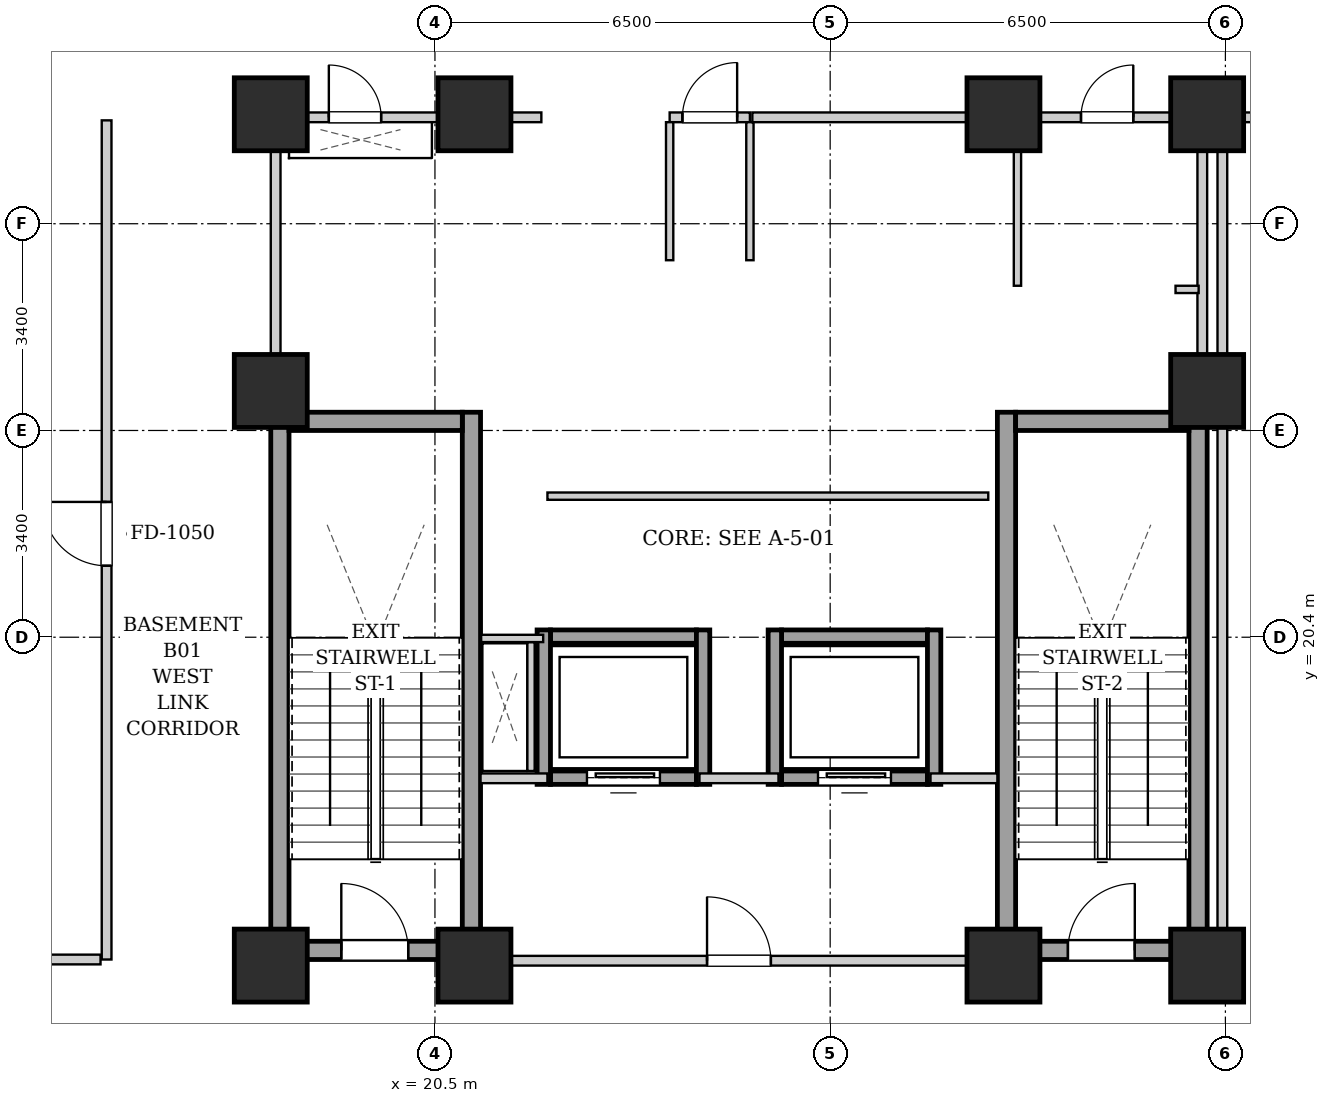
"""IFC4 building model, lengths in metres.
Left out: names, types, materials, properties, quantities, classifications, styles, units other than length and angle.
Written with IfcOpenShell. Run it as: python <this file> out.ifc"""

import sys

from ifc_helpers import new_model, si_unit, direction, frame, frame_2d, origin, origin_2d, place, context, subcontext, project, spatial, rectangle, extrude, element, fill, save


model = new_model("IFC4")
c1 = context("Model", 3, precision=1e-05, world=origin(), true_north=direction((0.0, 1.0)))
c2 = subcontext(c1, "Body", "Model", "MODEL_VIEW")
j1 = project(units=[si_unit("LENGTHUNIT", "METRE"), si_unit("PLANEANGLEUNIT", "RADIAN")], contexts=[c1])
p1 = place(None, origin())
s1 = spatial("IfcSite", under=j1, at=p1, CompositionType="ELEMENT")
p2 = place(p1, origin())
s2 = spatial("IfcBuilding", under=s1, at=p2, CompositionType="ELEMENT")
p3 = place(p2, frame((0.0, 0.0, -4.8)))
s3 = spatial("IfcBuildingStorey", under=s2, at=p3, CompositionType="ELEMENT", Elevation=-4.8)
for number, where, z_axis, x_axis in (
    (1, (17.8, 15.0, 0.0), (0.0, 0.0, 1.0), (1.0, 0.0, 0.0)),
    (2, (21.15, 15.0, 0.0), (0.0, 0.0, 1.0), (1.0, 0.0, 0.0)),
    (3, (29.85, 15.0, 0.0), (0.0, 0.0, 1.0), (1.0, 0.0, 0.0)),
    (4, (33.2, 15.0, 0.0), (0.0, 0.0, 1.0), (1.0, 0.0, 0.0)),
    (5, (17.8, 29.0, 0.0), (0.0, 0.0, 1.0), (1.0, 0.0, 0.0)),
    (6, (21.15, 29.0, 0.0), (0.0, 0.0, 1.0), (1.0, 0.0, 0.0)),
    (7, (29.85, 29.0, 0.0), (0.0, 0.0, 1.0), (1.0, 0.0, 0.0)),
    (8, (33.2, 29.0, 0.0), (0.0, 0.0, 1.0), (1.0, 0.0, 0.0)),
    (9, (17.8, 24.45, 0.0), (0.0, 0.0, 1.0), (1.0, 0.0, 0.0)),
    (10, (33.2, 24.45, 0.0), (0.0, 0.0, 1.0), (1.0, 0.0, 0.0)),
):
    element("IfcColumn", number, at=place(p3, frame(where, z_axis=z_axis, x_axis=x_axis)), inside=s3, PredefinedType="COLUMN", context=c2, shape_type="SweptSolid", body=[
        extrude(rectangle(XDim=1.2, YDim=1.2, at=origin_2d()), origin(), (0.0, 0.0, 1.0), 4.8),
    ])
for number, where, z_axis, x_axis in (
    (11, (17.95, 15.1, 0.0), (0.0, 0.0, 1.0), (0.0, 1.0, 0.0)),
    (12, (21.1, 15.1, 0.0), (0.0, 0.0, 1.0), (0.0, 1.0, 0.0)),
):
    element("IfcWall", number, at=place(p3, frame(where, z_axis=z_axis, x_axis=x_axis)), inside=s3, PredefinedType="SHEAR", context=c2, shape_type="SweptSolid", body=[
        extrude(rectangle(XDim=9.0, YDim=0.3, at=frame_2d((4.5, 0.0))), origin(), (0.0, 0.0, 1.0), 4.48),
    ])
p4 = place(p3, frame((18.1, 23.95, 0.0), z_axis=(0.0, 0.0, 1.0), x_axis=(1.0, 0.0, 0.0)))
e13 = element("IfcWall", 13, at=p4, inside=s3, PredefinedType="SHEAR", context=c2, shape_type="SweptSolid", body=[
    extrude(rectangle(XDim=2.85, YDim=0.3, at=frame_2d((1.425, 0.0))), origin(), (0.0, 0.0, 1.0), 4.48),
])
p5 = place(p3, frame((18.1, 15.25, 0.0), z_axis=(0.0, 0.0, 1.0), x_axis=(1.0, 0.0, 0.0)))
e14 = element("IfcWall", 14, at=p5, inside=s3, PredefinedType="SHEAR", context=c2, shape_type="SweptSolid", body=[
    extrude(rectangle(XDim=2.85, YDim=0.3, at=frame_2d((1.425, 0.0))), origin(), (0.0, 0.0, 1.0), 4.48),
])
p6 = place(p5, frame((0.86, 0.0, 0.0)))
e15 = element("IfcOpeningElement", 15, at=p6, cuts=e14, PredefinedType="OPENING", context=c2, shape_type="SweptSolid", body=[
    extrude(rectangle(XDim=1.1, YDim=2.05, at=frame_2d((0.55, 1.025))), frame((0.0, 0.16, 0.0), z_axis=(0.0, -1.0, 0.0), x_axis=(1.0, 0.0, 0.0)), (0.0, 0.0, 1.0), 0.32),
])
for number, where, z_axis, x_axis in (
    (16, (29.9, 15.1, 0.0), (0.0, 0.0, 1.0), (0.0, 1.0, 0.0)),
    (17, (33.05, 15.1, 0.0), (0.0, 0.0, 1.0), (0.0, 1.0, 0.0)),
):
    element("IfcWall", number, at=place(p3, frame(where, z_axis=z_axis, x_axis=x_axis)), inside=s3, PredefinedType="SHEAR", context=c2, shape_type="SweptSolid", body=[
        extrude(rectangle(XDim=9.0, YDim=0.3, at=frame_2d((4.5, 0.0))), origin(), (0.0, 0.0, 1.0), 4.48),
    ])
p7 = place(p3, frame((30.05, 23.95, 0.0), z_axis=(0.0, 0.0, 1.0), x_axis=(1.0, 0.0, 0.0)))
e18 = element("IfcWall", 18, at=p7, inside=s3, PredefinedType="SHEAR", context=c2, shape_type="SweptSolid", body=[
    extrude(rectangle(XDim=2.85, YDim=0.3, at=frame_2d((1.425, 0.0))), origin(), (0.0, 0.0, 1.0), 4.48),
])
p8 = place(p3, frame((30.05, 15.25, 0.0), z_axis=(0.0, 0.0, 1.0), x_axis=(1.0, 0.0, 0.0)))
e19 = element("IfcWall", 19, at=p8, inside=s3, PredefinedType="SHEAR", context=c2, shape_type="SweptSolid", body=[
    extrude(rectangle(XDim=2.85, YDim=0.3, at=frame_2d((1.425, 0.0))), origin(), (0.0, 0.0, 1.0), 4.48),
])
p9 = place(p8, frame((0.86, 0.0, 0.0)))
e20 = element("IfcOpeningElement", 20, at=p9, cuts=e19, PredefinedType="OPENING", context=c2, shape_type="SweptSolid", body=[
    extrude(rectangle(XDim=1.1, YDim=2.05, at=frame_2d((0.55, 1.025))), frame((0.0, 0.16, 0.0), z_axis=(0.0, -1.0, 0.0), x_axis=(1.0, 0.0, 0.0)), (0.0, 0.0, 1.0), 0.32),
])
p10 = place(p3, frame((22.4, 18.09, 0.0), z_axis=(0.0, 0.0, 1.0), x_axis=(1.0, 0.0, 0.0)))
e21 = element("IfcWall", 21, at=p10, inside=s3, PredefinedType="SHEAR", context=c2, shape_type="SweptSolid", body=[
    extrude(rectangle(XDim=2.4, YDim=0.22, at=frame_2d((1.2, 0.0))), origin(), (0.0, 0.0, 1.0), 4.48),
])
p11 = place(p10, frame((0.6, 0.0, 0.0)))
e22 = element("IfcOpeningElement", 22, at=p11, cuts=e21, PredefinedType="OPENING", context=c2, shape_type="SweptSolid", body=[
    extrude(rectangle(XDim=1.2, YDim=2.15, at=frame_2d((0.6, 1.075))), frame((0.0, 0.12, 0.0), z_axis=(0.0, -1.0, 0.0), x_axis=(1.0, 0.0, 0.0)), (0.0, 0.0, 1.0), 0.24),
])
p12 = place(p3, frame((22.4, 20.41, 0.0), z_axis=(0.0, 0.0, 1.0), x_axis=(1.0, 0.0, 0.0)))
e23 = element("IfcWall", 23, at=p12, inside=s3, PredefinedType="SHEAR", context=c2, shape_type="SweptSolid", body=[
    extrude(rectangle(XDim=2.4, YDim=0.22, at=frame_2d((1.2, 0.0))), origin(), (0.0, 0.0, 1.0), 4.48),
])
for number, where, z_axis, x_axis in (
    (24, (22.29, 17.98, 0.0), (0.0, 0.0, 1.0), (0.0, 1.0, 0.0)),
    (25, (24.91, 17.98, 0.0), (0.0, 0.0, 1.0), (0.0, 1.0, 0.0)),
):
    element("IfcWall", number, at=place(p3, frame(where, z_axis=z_axis, x_axis=x_axis)), inside=s3, PredefinedType="SHEAR", context=c2, shape_type="SweptSolid", body=[
        extrude(rectangle(XDim=2.54, YDim=0.22, at=frame_2d((1.27, 0.0))), origin(), (0.0, 0.0, 1.0), 4.48),
    ])
p13 = place(p3, frame((26.2, 18.09, 0.0), z_axis=(0.0, 0.0, 1.0), x_axis=(1.0, 0.0, 0.0)))
e26 = element("IfcWall", 26, at=p13, inside=s3, PredefinedType="SHEAR", context=c2, shape_type="SweptSolid", body=[
    extrude(rectangle(XDim=2.4, YDim=0.22, at=frame_2d((1.2, 0.0))), origin(), (0.0, 0.0, 1.0), 4.48),
])
p14 = place(p13, frame((0.6, 0.0, 0.0)))
e27 = element("IfcOpeningElement", 27, at=p14, cuts=e26, PredefinedType="OPENING", context=c2, shape_type="SweptSolid", body=[
    extrude(rectangle(XDim=1.2, YDim=2.15, at=frame_2d((0.6, 1.075))), frame((0.0, 0.12, 0.0), z_axis=(0.0, -1.0, 0.0), x_axis=(1.0, 0.0, 0.0)), (0.0, 0.0, 1.0), 0.24),
])
p15 = place(p3, frame((26.2, 20.41, 0.0), z_axis=(0.0, 0.0, 1.0), x_axis=(1.0, 0.0, 0.0)))
e28 = element("IfcWall", 28, at=p15, inside=s3, PredefinedType="SHEAR", context=c2, shape_type="SweptSolid", body=[
    extrude(rectangle(XDim=2.4, YDim=0.22, at=frame_2d((1.2, 0.0))), origin(), (0.0, 0.0, 1.0), 4.48),
])
for number, where, z_axis, x_axis in (
    (29, (26.09, 17.98, 0.0), (0.0, 0.0, 1.0), (0.0, 1.0, 0.0)),
    (30, (28.71, 17.98, 0.0), (0.0, 0.0, 1.0), (0.0, 1.0, 0.0)),
):
    element("IfcWall", number, at=place(p3, frame(where, z_axis=z_axis, x_axis=x_axis)), inside=s3, PredefinedType="SHEAR", context=c2, shape_type="SweptSolid", body=[
        extrude(rectangle(XDim=2.54, YDim=0.22, at=frame_2d((1.27, 0.0))), origin(), (0.0, 0.0, 1.0), 4.48),
    ])
p16 = place(p3, frame((21.25, 15.08, 0.0), z_axis=(0.0, 0.0, 1.0), x_axis=(1.0, 0.0, 0.0)))
e31 = element("IfcWall", 31, at=p16, inside=s3, PredefinedType="PARTITIONING", context=c2, shape_type="SweptSolid", body=[
    extrude(rectangle(XDim=8.5, YDim=0.16, at=frame_2d((4.25, 0.0))), origin(), (0.0, 0.0, 1.0), 4.48),
])
p17 = place(p16, frame((3.725, 0.0, 0.0)))
e32 = element("IfcOpeningElement", 32, at=p17, cuts=e31, PredefinedType="OPENING", context=c2, shape_type="SweptSolid", body=[
    extrude(rectangle(XDim=1.05, YDim=2.05, at=frame_2d((0.525, 1.025))), frame((0.0, 0.09, 0.0), z_axis=(0.0, -1.0, 0.0), x_axis=(1.0, 0.0, 0.0)), (0.0, 0.0, 1.0), 0.18),
])
p18 = place(p3, frame((21.25, 18.08, 0.0), z_axis=(0.0, 0.0, 1.0), x_axis=(1.0, 0.0, 0.0)))
e33 = element("IfcWall", 33, at=p18, inside=s3, PredefinedType="PARTITIONING", context=c2, shape_type="SweptSolid", body=[
    extrude(rectangle(XDim=1.1, YDim=0.16, at=frame_2d((0.55, 0.0))), origin(), (0.0, 0.0, 1.0), 4.48),
])
p19 = place(p3, frame((24.85, 18.08, 0.0), z_axis=(0.0, 0.0, 1.0), x_axis=(1.0, 0.0, 0.0)))
e34 = element("IfcWall", 34, at=p19, inside=s3, PredefinedType="PARTITIONING", context=c2, shape_type="SweptSolid", body=[
    extrude(rectangle(XDim=1.3, YDim=0.16, at=frame_2d((0.65, 0.0))), origin(), (0.0, 0.0, 1.0), 4.48),
])
p20 = place(p3, frame((28.65, 18.08, 0.0), z_axis=(0.0, 0.0, 1.0), x_axis=(1.0, 0.0, 0.0)))
e35 = element("IfcWall", 35, at=p20, inside=s3, PredefinedType="PARTITIONING", context=c2, shape_type="SweptSolid", body=[
    extrude(rectangle(XDim=1.1, YDim=0.16, at=frame_2d((0.55, 0.0))), origin(), (0.0, 0.0, 1.0), 4.48),
])
for number, where, z_axis, x_axis in (
    (36, (17.88, 24.12, 0.0), (0.0, 0.0, 1.0), (0.0, 1.0, 0.0)),
    (37, (33.12, 24.12, 0.0), (0.0, 0.0, 1.0), (0.0, 1.0, 0.0)),
):
    element("IfcWall", number, at=place(p3, frame(where, z_axis=z_axis, x_axis=x_axis)), inside=s3, PredefinedType="PARTITIONING", context=c2, shape_type="SweptSolid", body=[
        extrude(rectangle(XDim=4.76, YDim=0.16, at=frame_2d((2.38, 0.0))), origin(), (0.0, 0.0, 1.0), 4.48),
    ])
p21 = place(p3, frame((24.36, 28.95, 0.0), z_axis=(0.0, 0.0, 1.0), x_axis=(1.0, 0.0, 0.0)))
e38 = element("IfcWall", 38, at=p21, inside=s3, PredefinedType="PARTITIONING", context=c2, shape_type="SweptSolid", body=[
    extrude(rectangle(XDim=1.32, YDim=0.16, at=frame_2d((0.66, 0.0))), origin(), (0.0, 0.0, 1.0), 4.48),
])
p22 = place(p21, frame((0.21, 0.0, 0.0)))
e39 = element("IfcOpeningElement", 39, at=p22, cuts=e38, PredefinedType="OPENING", context=c2, shape_type="SweptSolid", body=[
    extrude(rectangle(XDim=0.9, YDim=2.05, at=frame_2d((0.45, 1.025))), frame((0.0, 0.09, 0.0), z_axis=(0.0, -1.0, 0.0), x_axis=(1.0, 0.0, 0.0)), (0.0, 0.0, 1.0), 0.18),
])
p23 = place(p3, frame((17.96, 28.95, 0.0), z_axis=(0.0, 0.0, 1.0), x_axis=(1.0, 0.0, 0.0)))
e40 = element("IfcWall", 40, at=p23, inside=s3, PredefinedType="PARTITIONING", context=c2, shape_type="SweptSolid", body=[
    extrude(rectangle(XDim=4.29, YDim=0.16, at=frame_2d((2.145, 0.0))), origin(), (0.0, 0.0, 1.0), 4.48),
])
p24 = place(p23, frame((0.795, 0.0, 0.0)))
e41 = element("IfcOpeningElement", 41, at=p24, cuts=e40, PredefinedType="OPENING", context=c2, shape_type="SweptSolid", body=[
    extrude(rectangle(XDim=0.86, YDim=2.05, at=frame_2d((0.43, 1.025))), frame((0.0, 0.09, 0.0), z_axis=(0.0, -1.0, 0.0), x_axis=(1.0, 0.0, 0.0)), (0.0, 0.0, 1.0), 0.18),
])
p25 = place(p3, frame((22.08, 18.2, 0.0), z_axis=(0.0, 0.0, 1.0), x_axis=(0.0, 1.0, 0.0)))
e42 = element("IfcWall", 42, at=p25, inside=s3, PredefinedType="PARTITIONING", context=c2, shape_type="SweptSolid", body=[
    extrude(rectangle(XDim=2.12, YDim=0.12, at=frame_2d((1.06, 0.0))), origin(), (0.0, 0.0, 1.0), 4.48),
])
p26 = place(p3, frame((22.28, 20.38, 0.0), z_axis=(0.0, 0.0, 1.0), x_axis=(-1.0, 0.0, 0.0)))
e43 = element("IfcWall", 43, at=p26, inside=s3, PredefinedType="PARTITIONING", context=c2, shape_type="SweptSolid", body=[
    extrude(rectangle(XDim=1.02, YDim=0.12, at=frame_2d((0.51, 0.0))), origin(), (0.0, 0.0, 1.0), 4.48),
])
for number, where, z_axis, x_axis in (
    (44, (24.36, 26.6, 0.0), (0.0, 0.0, 1.0), (0.0, 1.0, 0.0)),
    (45, (25.68, 26.6, 0.0), (0.0, 0.0, 1.0), (0.0, 1.0, 0.0)),
):
    element("IfcWall", number, at=place(p3, frame(where, z_axis=z_axis, x_axis=x_axis)), inside=s3, PredefinedType="PARTITIONING", context=c2, shape_type="SweptSolid", body=[
        extrude(rectangle(XDim=2.27, YDim=0.12, at=frame_2d((1.135, 0.0))), origin(), (0.0, 0.0, 1.0), 4.48),
    ])
p27 = place(p3, frame((30.08, 26.18, 0.0), z_axis=(0.0, 0.0, 1.0), x_axis=(0.0, 1.0, 0.0)))
e46 = element("IfcWall", 46, at=p27, inside=s3, PredefinedType="PARTITIONING", context=c2, shape_type="SweptSolid", body=[
    extrude(rectangle(XDim=2.68, YDim=0.12, at=frame_2d((1.34, 0.0))), origin(), (0.0, 0.0, 1.0), 4.48),
])
p28 = place(p3, frame((32.68, 26.12, 0.0), z_axis=(0.0, 0.0, 1.0), x_axis=(1.0, 0.0, 0.0)))
e47 = element("IfcWall", 47, at=p28, inside=s3, PredefinedType="PARTITIONING", context=c2, shape_type="SweptSolid", body=[
    extrude(rectangle(XDim=0.38, YDim=0.12, at=frame_2d((0.19, 0.0))), origin(), (0.0, 0.0, 1.0), 4.48),
])
p29 = place(p3, frame((30.08, 28.95, 0.0), z_axis=(0.0, 0.0, 1.0), x_axis=(1.0, 0.0, 0.0)))
e48 = element("IfcWall", 48, at=p29, inside=s3, PredefinedType="PARTITIONING", context=c2, shape_type="SweptSolid", body=[
    extrude(rectangle(XDim=2.96, YDim=0.16, at=frame_2d((1.48, 0.0))), origin(), (0.0, 0.0, 1.0), 4.48),
])
p30 = place(p29, frame((1.045, 0.0, 0.0)))
e49 = element("IfcOpeningElement", 49, at=p30, cuts=e48, PredefinedType="OPENING", context=c2, shape_type="SweptSolid", body=[
    extrude(rectangle(XDim=0.86, YDim=2.05, at=frame_2d((0.43, 1.025))), frame((0.0, 0.09, 0.0), z_axis=(0.0, -1.0, 0.0), x_axis=(1.0, 0.0, 0.0)), (0.0, 0.0, 1.0), 0.18),
])
p31 = place(p3, frame((25.72, 28.95, 0.0), z_axis=(0.0, 0.0, 1.0), x_axis=(1.0, 0.0, 0.0)))
e50 = element("IfcWall", 50, at=p31, inside=s3, PredefinedType="PARTITIONING", context=c2, shape_type="SweptSolid", body=[
    extrude(rectangle(XDim=4.3, YDim=0.16, at=frame_2d((2.15, 0.0))), origin(), (0.0, 0.0, 1.0), 4.48),
])
p32 = place(p3, frame((22.35, 22.72, 0.0), z_axis=(0.0, 0.0, 1.0), x_axis=(1.0, 0.0, 0.0)))
e51 = element("IfcWall", 51, at=p32, inside=s3, PredefinedType="PARTITIONING", context=c2, shape_type="SweptSolid", body=[
    extrude(rectangle(XDim=7.25, YDim=0.12, at=frame_2d((3.625, 0.0))), origin(), (0.0, 0.0, 1.0), 4.48),
])
p33 = place(p3, frame((15.1, 15.1, 0.0), z_axis=(0.0, 0.0, 1.0), x_axis=(0.0, 1.0, 0.0)))
e52 = element("IfcWall", 52, at=p33, inside=s3, PredefinedType="PARTITIONING", context=c2, shape_type="SweptSolid", body=[
    extrude(rectangle(XDim=13.8, YDim=0.16, at=frame_2d((6.9, 0.0))), origin(), (0.0, 0.0, 1.0), 4.48),
])
p34 = place(p33, frame((6.475, 0.0, 0.0)))
e53 = element("IfcOpeningElement", 53, at=p34, cuts=e52, PredefinedType="OPENING", context=c2, shape_type="SweptSolid", body=[
    extrude(rectangle(XDim=1.05, YDim=2.05, at=frame_2d((0.525, 1.025))), frame((0.0, 0.09, 0.0), z_axis=(0.0, -1.0, 0.0), x_axis=(1.0, 0.0, 0.0)), (0.0, 0.0, 1.0), 0.18),
])
p35 = place(p3, frame((5.65, 15.1, 0.0), z_axis=(0.0, 0.0, 1.0), x_axis=(1.0, 0.0, 0.0)))
e54 = element("IfcWall", 54, at=p35, inside=s3, PredefinedType="PARTITIONING", context=c2, shape_type="SweptSolid", body=[
    extrude(rectangle(XDim=9.35, YDim=0.16, at=frame_2d((4.675, 0.0))), origin(), (0.0, 0.0, 1.0), 3.565),
])
p36 = place(p3, frame((33.45, 28.95, 0.0), z_axis=(0.0, 0.0, 1.0), x_axis=(1.0, 0.0, 0.0)))
e55 = element("IfcWall", 55, at=p36, inside=s3, PredefinedType="PARTITIONING", context=c2, shape_type="SweptSolid", body=[
    extrude(rectangle(XDim=12.05, YDim=0.16, at=frame_2d((6.025, 0.0))), origin(), (0.0, 0.0, 1.0), 3.565),
])
p37 = place(p36, frame((5.475, 0.0, 0.0)))
e56 = element("IfcOpeningElement", 56, at=p37, cuts=e55, PredefinedType="OPENING", context=c2, shape_type="SweptSolid", body=[
    extrude(rectangle(XDim=1.05, YDim=2.05, at=frame_2d((0.525, 1.025))), frame((0.0, 0.09, 0.0), z_axis=(0.0, -1.0, 0.0), x_axis=(1.0, 0.0, 0.0)), (0.0, 0.0, 1.0), 0.18),
])
p38 = place(p3, frame((33.45, 15.1, 0.0), z_axis=(0.0, 0.0, 1.0), x_axis=(0.0, 1.0, 0.0)))
e57 = element("IfcWall", 57, at=p38, inside=s3, PredefinedType="PARTITIONING", context=c2, shape_type="SweptSolid", body=[
    extrude(rectangle(XDim=13.78, YDim=0.16, at=frame_2d((6.89, 0.0))), origin(), (0.0, 0.0, 1.0), 4.48),
])
p39 = place(p6, origin())
e58 = element("IfcDoor", 58, at=p39, inside=s3, OperationType="SINGLE_SWING_LEFT", PredefinedType="DOOR", context=c2, shape_type="SweptSolid", body=[
    extrude(rectangle(XDim=1.1, YDim=2.05, at=frame_2d((0.55, 1.025))), frame((0.0, 0.025, 0.0), z_axis=(0.0, -1.0, 0.0), x_axis=(1.0, 0.0, 0.0)), (0.0, 0.0, 1.0), 0.05),
])
fill(e15, e58)
p40 = place(p9, origin())
e59 = element("IfcDoor", 59, at=p40, inside=s3, OperationType="SINGLE_SWING_RIGHT", PredefinedType="DOOR", context=c2, shape_type="SweptSolid", body=[
    extrude(rectangle(XDim=1.1, YDim=2.05, at=frame_2d((0.55, 1.025))), frame((0.0, 0.025, 0.0), z_axis=(0.0, -1.0, 0.0), x_axis=(1.0, 0.0, 0.0)), (0.0, 0.0, 1.0), 0.05),
])
fill(e20, e59)
p41 = place(p11, origin())
e60 = element("IfcDoor", 60, at=p41, inside=s3, OperationType="SLIDING_TO_LEFT", PredefinedType="DOOR", context=c2, shape_type="SweptSolid", body=[
    extrude(rectangle(XDim=1.2, YDim=2.15, at=frame_2d((0.6, 1.075))), frame((0.0, 0.025, 0.0), z_axis=(0.0, -1.0, 0.0), x_axis=(1.0, 0.0, 0.0)), (0.0, 0.0, 1.0), 0.05),
])
fill(e22, e60)
p42 = place(p14, origin())
e61 = element("IfcDoor", 61, at=p42, inside=s3, OperationType="SLIDING_TO_LEFT", PredefinedType="DOOR", context=c2, shape_type="SweptSolid", body=[
    extrude(rectangle(XDim=1.2, YDim=2.15, at=frame_2d((0.6, 1.075))), frame((0.0, 0.025, 0.0), z_axis=(0.0, -1.0, 0.0), x_axis=(1.0, 0.0, 0.0)), (0.0, 0.0, 1.0), 0.05),
])
fill(e27, e61)
p43 = place(p17, origin())
e62 = element("IfcDoor", 62, at=p43, inside=s3, OperationType="SINGLE_SWING_LEFT", PredefinedType="DOOR", context=c2, shape_type="SweptSolid", body=[
    extrude(rectangle(XDim=1.05, YDim=2.05, at=frame_2d((0.525, 1.025))), frame((0.0, 0.025, 0.0), z_axis=(0.0, -1.0, 0.0), x_axis=(1.0, 0.0, 0.0)), (0.0, 0.0, 1.0), 0.05),
])
fill(e32, e62)
p44 = place(p22, origin())
e63 = element("IfcDoor", 63, at=p44, inside=s3, OperationType="SINGLE_SWING_RIGHT", PredefinedType="DOOR", context=c2, shape_type="SweptSolid", body=[
    extrude(rectangle(XDim=0.9, YDim=2.05, at=frame_2d((0.45, 1.025))), frame((0.0, 0.025, 0.0), z_axis=(0.0, -1.0, 0.0), x_axis=(1.0, 0.0, 0.0)), (0.0, 0.0, 1.0), 0.05),
])
fill(e39, e63)
p45 = place(p24, origin())
e64 = element("IfcDoor", 64, at=p45, inside=s3, OperationType="SINGLE_SWING_LEFT", PredefinedType="DOOR", context=c2, shape_type="SweptSolid", body=[
    extrude(rectangle(XDim=0.86, YDim=2.05, at=frame_2d((0.43, 1.025))), frame((0.0, 0.025, 0.0), z_axis=(0.0, -1.0, 0.0), x_axis=(1.0, 0.0, 0.0)), (0.0, 0.0, 1.0), 0.05),
])
fill(e41, e64)
p46 = place(p30, origin())
e65 = element("IfcDoor", 65, at=p46, inside=s3, OperationType="SINGLE_SWING_RIGHT", PredefinedType="DOOR", context=c2, shape_type="SweptSolid", body=[
    extrude(rectangle(XDim=0.86, YDim=2.05, at=frame_2d((0.43, 1.025))), frame((0.0, 0.025, 0.0), z_axis=(0.0, -1.0, 0.0), x_axis=(1.0, 0.0, 0.0)), (0.0, 0.0, 1.0), 0.05),
])
fill(e49, e65)
p47 = place(p34, origin())
e66 = element("IfcDoor", 66, at=p47, inside=s3, OperationType="SINGLE_SWING_RIGHT", PredefinedType="DOOR", context=c2, shape_type="SweptSolid", body=[
    extrude(rectangle(XDim=1.05, YDim=2.05, at=frame_2d((0.525, 1.025))), frame((0.0, 0.025, 0.0), z_axis=(0.0, -1.0, 0.0), x_axis=(1.0, 0.0, 0.0)), (0.0, 0.0, 1.0), 0.05),
])
fill(e53, e66)
save(model, sys.argv[1])
